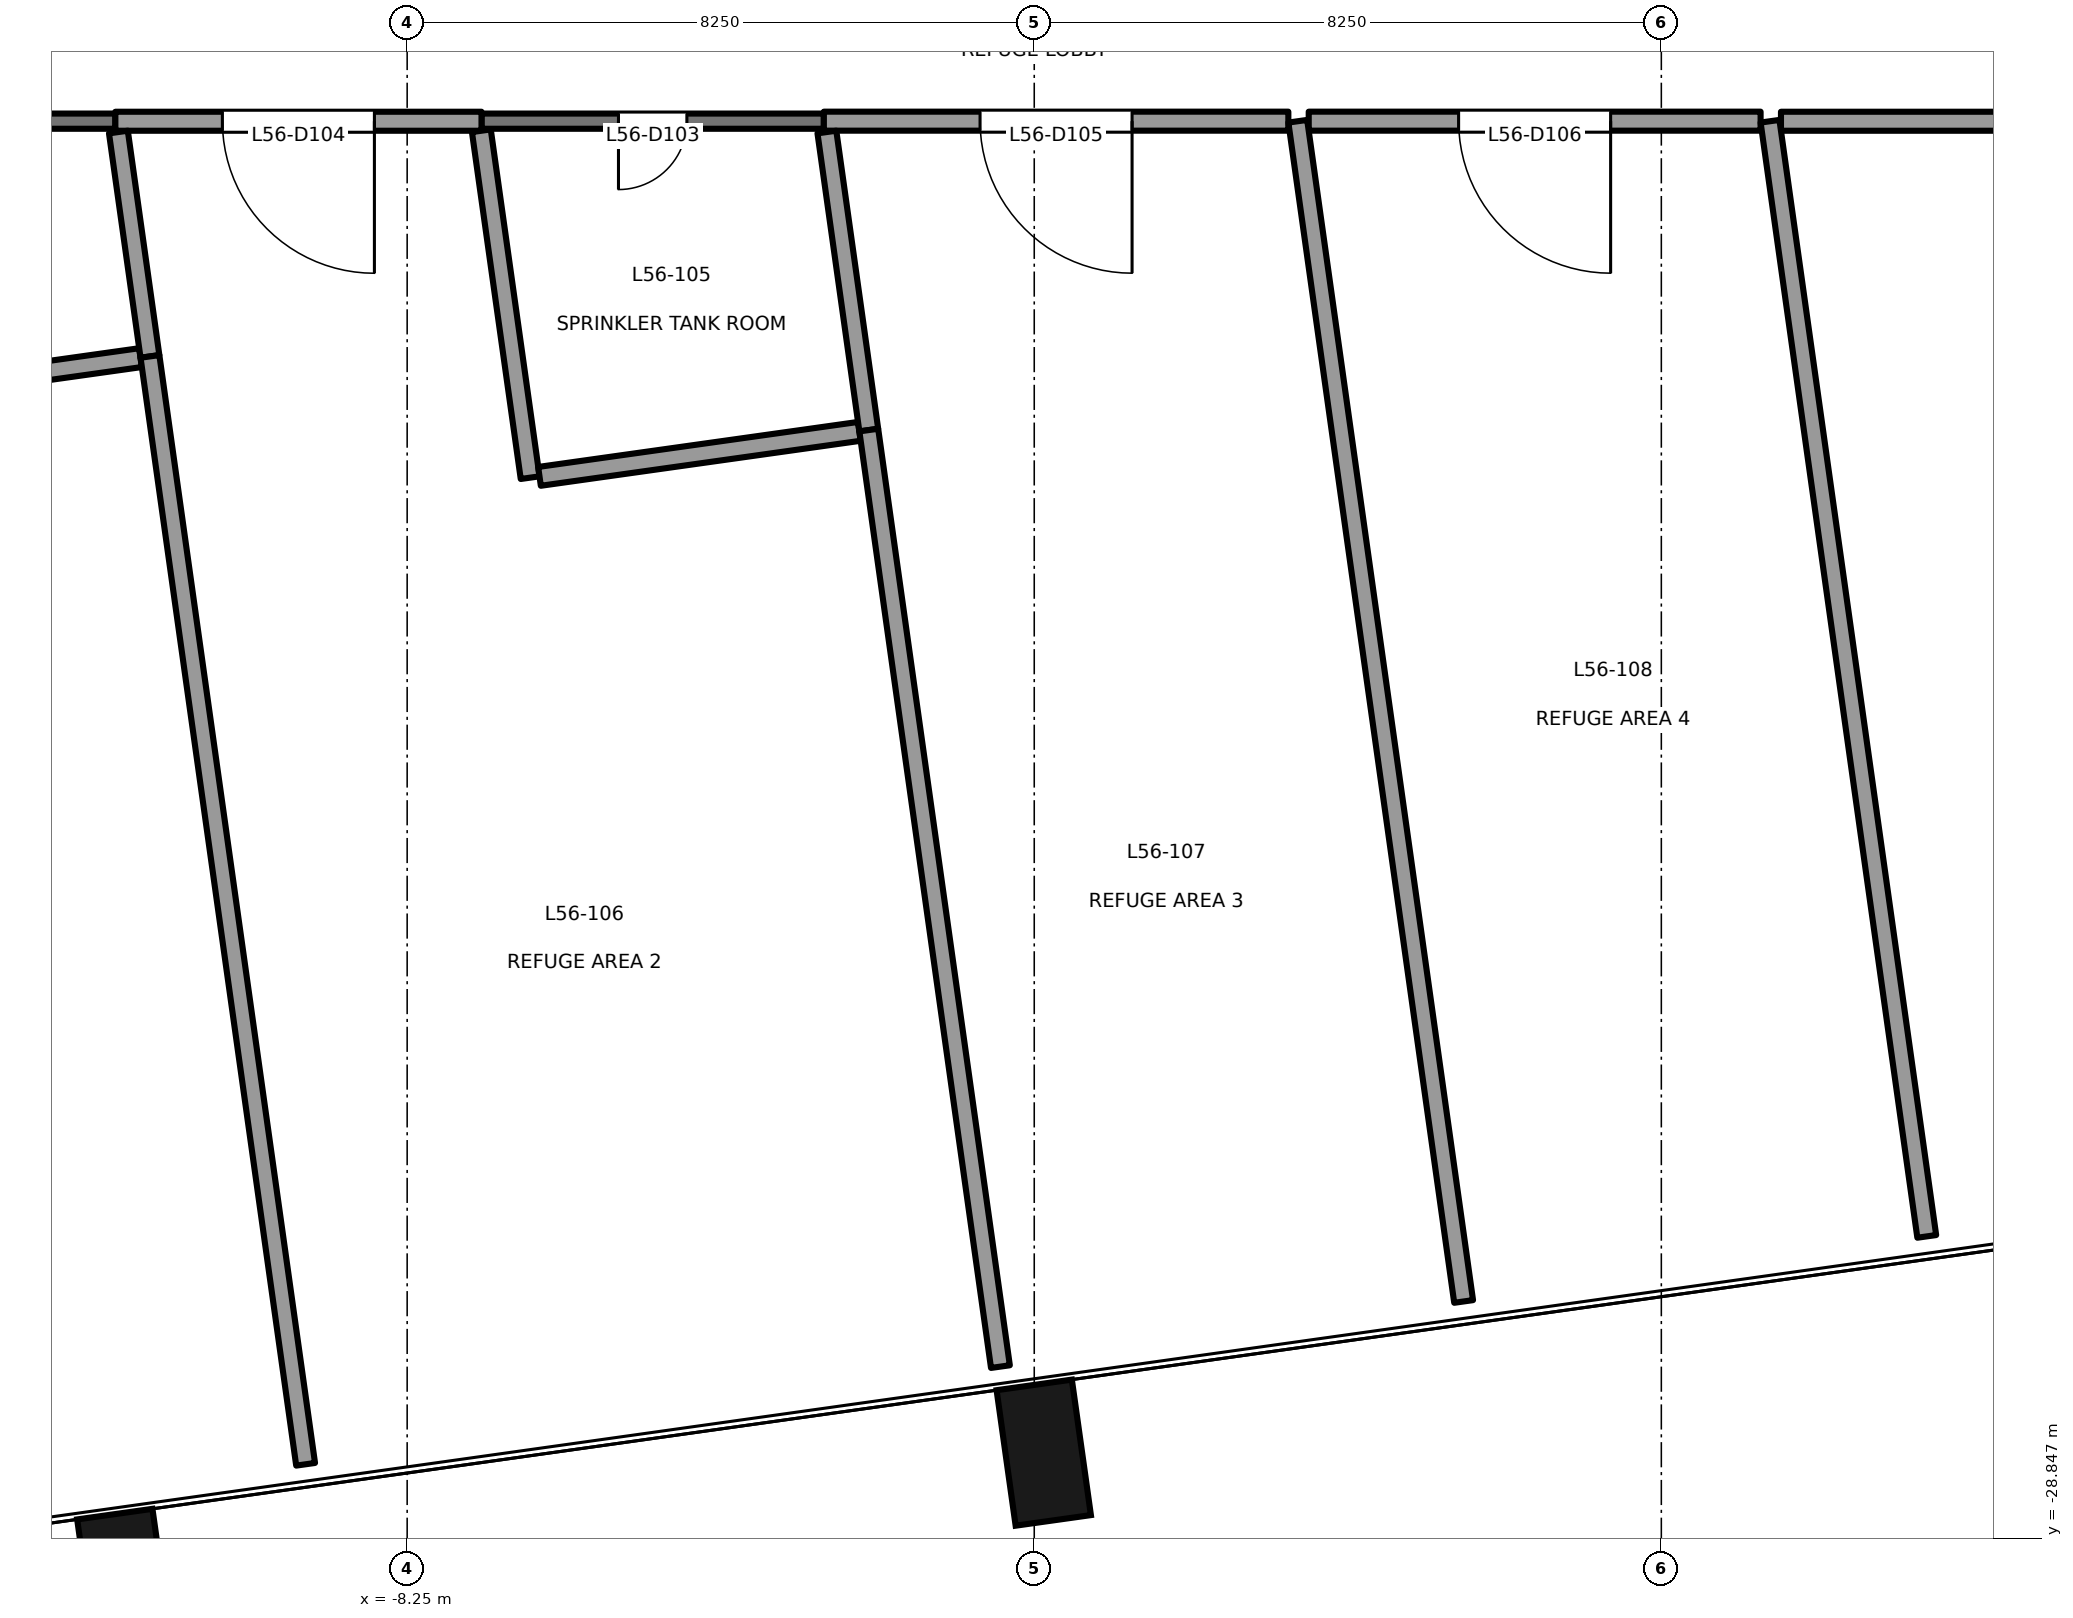
"""IFC4 building model, lengths in metres.
Left out: names, types, materials, properties, quantities, classifications, styles, units other than length and angle.
Written with IfcOpenShell. Run it as: python <this file> out.ifc"""

import sys

from ifc_helpers import new_model, si_unit, direction, frame, frame_2d, origin, origin_2d, place, context, subcontext, project, spatial, rectangle, extrude, element, fill, save


model = new_model("IFC4")
c1 = context("Model", 3, precision=1e-05, world=origin(), true_north=direction((0.0, 1.0)))
c2 = subcontext(c1, "Body", "Model", "MODEL_VIEW")
j1 = project(units=[si_unit("LENGTHUNIT", "METRE"), si_unit("PLANEANGLEUNIT", "RADIAN")], contexts=[c1])
p1 = place(None, origin())
s1 = spatial("IfcSite", under=j1, at=p1, CompositionType="ELEMENT")
p2 = place(p1, origin())
s2 = spatial("IfcBuilding", under=s1, at=p2, CompositionType="ELEMENT")
p3 = place(p2, frame((0.0, 0.0, 244.7)))
s3 = spatial("IfcBuildingStorey", under=s2, at=p3, CompositionType="ELEMENT", Elevation=244.7)
for number, where, z_axis, x_axis in (
    (1, (-11.971, -29.416, -0.2), (0.0, 0.0, 1.0), (0.99, 0.139, 0.0)),
    (2, (0.125, -27.716, -0.2), (0.0, 0.0, 1.0), (0.99, 0.139, 0.0)),
):
    element("IfcColumn", number, at=place(p3, frame(where, z_axis=z_axis, x_axis=x_axis)), inside=s3, PredefinedType="COLUMN", context=c2, shape_type="SweptSolid", body=[
        extrude(rectangle(XDim=1.0, YDim=1.8, at=origin_2d()), origin(), (0.0, 0.0, 1.0), 5.0),
    ])
p4 = place(p3, frame((-12.089, -10.199, 0.0), z_axis=(0.0, 0.0, 1.0), x_axis=(-1.0, 0.0, 0.0)))
e3 = element("IfcWall", 3, at=p4, inside=s3, PredefinedType="PARTITIONING", context=c2, shape_type="SweptSolid", body=[
    extrude(rectangle(XDim=4.385, YDim=0.2, at=frame_2d((2.192, 0.0))), origin(), (0.0, 0.0, 1.0), 3.9),
])
p5 = place(p4, frame((1.743, 0.0, 0.0)))
e4 = element("IfcOpeningElement", 4, at=p5, cuts=e3, PredefinedType="OPENING", context=c2, shape_type="SweptSolid", body=[
    extrude(rectangle(XDim=0.9, YDim=2.1, at=frame_2d((0.45, 1.05))), frame((0.0, 0.111, 0.0), z_axis=(0.0, -1.0, 0.0), x_axis=(1.0, 0.0, 0.0)), (0.0, 0.0, 1.0), 0.221),
])
p6 = place(p3, frame((-2.768, -10.199, 0.0), z_axis=(0.0, 0.0, 1.0), x_axis=(-1.0, 0.0, 0.0)))
e5 = element("IfcWall", 5, at=p6, inside=s3, PredefinedType="PARTITIONING", context=c2, shape_type="SweptSolid", body=[
    extrude(rectangle(XDim=4.504, YDim=0.2, at=frame_2d((2.252, 0.0))), origin(), (0.0, 0.0, 1.0), 3.9),
])
p7 = place(p6, frame((1.802, 0.0, 0.0)))
e6 = element("IfcOpeningElement", 6, at=p7, cuts=e5, PredefinedType="OPENING", context=c2, shape_type="SweptSolid", body=[
    extrude(rectangle(XDim=0.9, YDim=2.1, at=frame_2d((0.45, 1.05))), frame((0.0, 0.111, 0.0), z_axis=(0.0, -1.0, 0.0), x_axis=(1.0, 0.0, 0.0)), (0.0, 0.0, 1.0), 0.221),
])
p8 = place(p3, frame((-7.272, -10.2, 0.0), z_axis=(0.0, 0.0, 1.0), x_axis=(-1.0, 0.0, 0.0)))
e7 = element("IfcWall", 7, at=p8, inside=s3, PredefinedType="PARTITIONING", context=c2, shape_type="SweptSolid", body=[
    extrude(rectangle(XDim=4.817, YDim=0.25, at=frame_2d((2.409, 0.0))), origin(), (0.0, 0.0, 1.0), 3.9),
])
p9 = place(p8, frame((1.409, 0.0, 0.0)))
e8 = element("IfcOpeningElement", 8, at=p9, cuts=e7, PredefinedType="OPENING", context=c2, shape_type="SweptSolid", body=[
    extrude(rectangle(XDim=2.0, YDim=2.1, at=frame_2d((1.0, 1.05))), frame((0.0, 0.135, 0.0), z_axis=(0.0, -1.0, 0.0), x_axis=(1.0, 0.0, 0.0)), (0.0, 0.0, 1.0), 0.271),
])
p10 = place(p3, frame((3.343, -10.199, 0.0), z_axis=(0.0, 0.0, 1.0), x_axis=(-1.0, 0.0, 0.0)))
e9 = element("IfcWall", 9, at=p10, inside=s3, PredefinedType="PARTITIONING", context=c2, shape_type="SweptSolid", body=[
    extrude(rectangle(XDim=6.111, YDim=0.25, at=frame_2d((3.056, 0.0))), origin(), (0.0, 0.0, 1.0), 4.0),
])
p11 = place(p10, frame((2.056, 0.0, 0.0)))
e10 = element("IfcOpeningElement", 10, at=p11, cuts=e9, PredefinedType="OPENING", context=c2, shape_type="SweptSolid", body=[
    extrude(rectangle(XDim=2.0, YDim=2.1, at=frame_2d((1.0, 1.05))), frame((0.0, 0.135, 0.0), z_axis=(0.0, -1.0, 0.0), x_axis=(1.0, 0.0, 0.0)), (0.0, 0.0, 1.0), 0.271),
])
p12 = place(p3, frame((9.556, -10.199, 0.0), z_axis=(0.0, 0.0, 1.0), x_axis=(-1.0, 0.0, 0.0)))
e11 = element("IfcWall", 11, at=p12, inside=s3, PredefinedType="PARTITIONING", context=c2, shape_type="SweptSolid", body=[
    extrude(rectangle(XDim=5.945, YDim=0.25, at=frame_2d((2.972, 0.0))), origin(), (0.0, 0.0, 1.0), 4.0),
])
p13 = place(p12, frame((1.973, 0.0, 0.0)))
e12 = element("IfcOpeningElement", 12, at=p13, cuts=e11, PredefinedType="OPENING", context=c2, shape_type="SweptSolid", body=[
    extrude(rectangle(XDim=2.0, YDim=2.1, at=frame_2d((1.0, 1.05))), frame((0.0, 0.135, 0.0), z_axis=(0.0, -1.0, 0.0), x_axis=(1.0, 0.0, 0.0)), (0.0, 0.0, 1.0), 0.271),
])
p14 = place(p3, frame((19.8, -10.2, 0.0), z_axis=(0.0, 0.0, 1.0), x_axis=(-1.0, 0.0, 0.0)))
e13 = element("IfcWall", 13, at=p14, inside=s3, PredefinedType="PARTITIONING", context=c2, shape_type="SweptSolid", body=[
    extrude(rectangle(XDim=9.976, YDim=0.25, at=frame_2d((4.988, 0.0))), origin(), (0.0, 0.0, 1.0), 4.1),
])
p15 = place(p14, frame((3.988, 0.0, 0.0)))
e14 = element("IfcOpeningElement", 14, at=p15, cuts=e13, PredefinedType="OPENING", context=c2, shape_type="SweptSolid", body=[
    extrude(rectangle(XDim=2.0, YDim=2.1, at=frame_2d((1.0, 1.05))), frame((0.0, 0.135, 0.0), z_axis=(0.0, -1.0, 0.0), x_axis=(1.0, 0.0, 0.0)), (0.0, 0.0, 1.0), 0.271),
])
p16 = place(p3, frame((-11.758, -13.31, 0.0), z_axis=(0.0, 0.0, 1.0), x_axis=(-0.990270519577, -0.139155661248, 0.0)))
e15 = element("IfcWall", 15, at=p16, inside=s3, PredefinedType="PARTITIONING", context=c2, shape_type="SweptSolid", body=[
    extrude(rectangle(XDim=4.375, YDim=0.25, at=frame_2d((2.188, 0.0))), origin(), (0.0, 0.0, 1.0), 3.9),
])
p17 = place(p3, frame((-12.049, -10.342, 0.0), z_axis=(0.0, 0.0, 1.0), x_axis=(0.139230988623, -0.990259931436, 0.0)))
e16 = element("IfcWall", 16, at=p17, inside=s3, PredefinedType="PARTITIONING", context=c2, shape_type="SweptSolid", body=[
    extrude(rectangle(XDim=2.981, YDim=0.25, at=frame_2d((1.49, 0.0))), origin(), (0.0, 0.0, 1.0), 4.8),
])
p18 = place(p3, frame((-11.634, -13.294, 0.0), z_axis=(0.0, 0.0, 1.0), x_axis=(0.139154438601, -0.990270691386, 0.0)))
e17 = element("IfcWall", 17, at=p18, inside=s3, PredefinedType="PARTITIONING", context=c2, shape_type="SweptSolid", body=[
    extrude(rectangle(XDim=14.718, YDim=0.25, at=frame_2d((7.359, 0.0))), origin(), (0.0, 0.0, 1.0), 3.7),
])
p19 = place(p3, frame((-6.632, -14.889, 0.0), z_axis=(0.0, 0.0, 1.0), x_axis=(-0.139262947739, 0.990255437444, 0.0)))
e18 = element("IfcWall", 18, at=p19, inside=s3, PredefinedType="PARTITIONING", context=c2, shape_type="SweptSolid", body=[
    extrude(rectangle(XDim=4.609, YDim=0.25, at=frame_2d((2.304, 0.0))), origin(), (0.0, 0.0, 1.0), 4.8),
])
p20 = place(p3, frame((-2.301, -14.28, 0.0), z_axis=(0.0, 0.0, 1.0), x_axis=(-0.990247168547, -0.139321732637, 0.0)))
e19 = element("IfcWall", 19, at=p20, inside=s3, PredefinedType="PARTITIONING", context=c2, shape_type="SweptSolid", body=[
    extrude(rectangle(XDim=4.25, YDim=0.25, at=frame_2d((2.125, 0.0))), origin(), (0.0, 0.0, 1.0), 3.9),
])
p21 = place(p3, frame((-2.728, -10.342, 0.0), z_axis=(0.0, 0.0, 1.0), x_axis=(0.139167912631, -0.9902687979, 0.0)))
e20 = element("IfcWall", 20, at=p21, inside=s3, PredefinedType="PARTITIONING", context=c2, shape_type="SweptSolid", body=[
    extrude(rectangle(XDim=3.959, YDim=0.25, at=frame_2d((1.98, 0.0))), origin(), (0.0, 0.0, 1.0), 4.8),
])
p22 = place(p3, frame((-2.177, -14.263, 0.0), z_axis=(0.0, 0.0, 1.0), x_axis=(0.139198609883, -0.990264483361, 0.0)))
e21 = element("IfcWall", 21, at=p22, inside=s3, PredefinedType="PARTITIONING", context=c2, shape_type="SweptSolid", body=[
    extrude(rectangle(XDim=12.442, YDim=0.25, at=frame_2d((6.221, 0.0))), origin(), (0.0, 0.0, 1.0), 3.7),
])
p23 = place(p3, frame((3.467, -10.2, 0.0), z_axis=(0.0, 0.0, 1.0), x_axis=(0.13915391479, -0.990270764992, 0.0)))
e22 = element("IfcWall", 22, at=p23, inside=s3, PredefinedType="PARTITIONING", context=c2, shape_type="SweptSolid", body=[
    extrude(rectangle(XDim=15.68, YDim=0.25, at=frame_2d((7.84, 0.0))), origin(), (0.0, 0.0, 1.0), 3.7),
])
p24 = place(p3, frame((9.68, -10.2, 0.0), z_axis=(0.0, 0.0, 1.0), x_axis=(0.139180851487, -0.990266979445, 0.0)))
e23 = element("IfcWall", 23, at=p24, inside=s3, PredefinedType="PARTITIONING", context=c2, shape_type="SweptSolid", body=[
    extrude(rectangle(XDim=14.815, YDim=0.25, at=frame_2d((7.408, 0.0))), origin(), (0.0, 0.0, 1.0), 3.7),
])
p25 = place(p7, origin())
e24 = element("IfcDoor", 24, at=p25, inside=s3, OperationType="SINGLE_SWING_RIGHT", PredefinedType="DOOR", context=c2, shape_type="SweptSolid", body=[
    extrude(rectangle(XDim=0.9, YDim=2.1, at=frame_2d((0.45, 1.05))), frame((0.0, 0.025, 0.0), z_axis=(0.0, -1.0, 0.0), x_axis=(1.0, 0.0, 0.0)), (0.0, 0.0, 1.0), 0.05),
])
fill(e6, e24)
p26 = place(p9, origin())
e25 = element("IfcDoor", 25, at=p26, inside=s3, OperationType="DOUBLE_DOOR_SINGLE_SWING", PredefinedType="DOOR", context=c2, shape_type="SweptSolid", body=[
    extrude(rectangle(XDim=2.0, YDim=2.1, at=frame_2d((1.0, 1.05))), frame((0.0, 0.025, 0.0), z_axis=(0.0, -1.0, 0.0), x_axis=(1.0, 0.0, 0.0)), (0.0, 0.0, 1.0), 0.05),
])
fill(e8, e25)
p27 = place(p11, origin())
e26 = element("IfcDoor", 26, at=p27, inside=s3, OperationType="DOUBLE_DOOR_SINGLE_SWING", PredefinedType="DOOR", context=c2, shape_type="SweptSolid", body=[
    extrude(rectangle(XDim=2.0, YDim=2.1, at=frame_2d((1.0, 1.05))), frame((0.0, 0.025, 0.0), z_axis=(0.0, -1.0, 0.0), x_axis=(1.0, 0.0, 0.0)), (0.0, 0.0, 1.0), 0.05),
])
fill(e10, e26)
p28 = place(p13, origin())
e27 = element("IfcDoor", 27, at=p28, inside=s3, OperationType="DOUBLE_DOOR_SINGLE_SWING", PredefinedType="DOOR", context=c2, shape_type="SweptSolid", body=[
    extrude(rectangle(XDim=2.0, YDim=2.1, at=frame_2d((1.0, 1.05))), frame((0.0, 0.025, 0.0), z_axis=(0.0, -1.0, 0.0), x_axis=(1.0, 0.0, 0.0)), (0.0, 0.0, 1.0), 0.05),
])
fill(e12, e27)
save(model, sys.argv[1])
